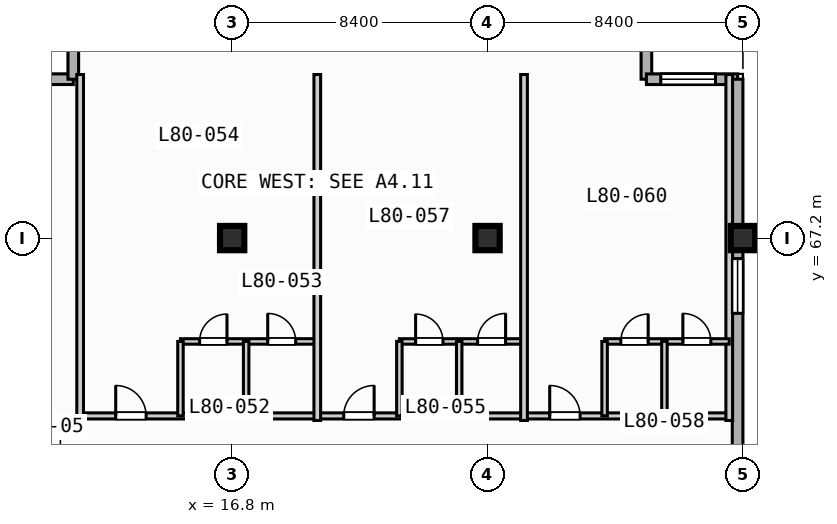
"""IFC4 building model, lengths in metres.
Left out: names, types, materials, properties, quantities, classifications, styles, units other than length and angle.
Written with IfcOpenShell. Run it as: python <this file> out.ifc"""

import sys

from ifc_helpers import new_model, si_unit, direction, frame, frame_2d, origin, origin_2d, place, context, subcontext, project, spatial, rectangle, extrude, element, fill, save


model = new_model("IFC4")
c1 = context("Model", 3, precision=1e-05, world=origin(), true_north=direction((0.0, 1.0)))
c2 = subcontext(c1, "Body", "Model", "MODEL_VIEW")
j1 = project(units=[si_unit("LENGTHUNIT", "METRE"), si_unit("PLANEANGLEUNIT", "RADIAN")], contexts=[c1])
p1 = place(None, origin())
s1 = spatial("IfcSite", under=j1, at=p1, CompositionType="ELEMENT")
p2 = place(p1, origin())
s2 = spatial("IfcBuilding", under=s1, at=p2, CompositionType="ELEMENT")
p3 = place(p2, frame((0.0, 0.0, 324.2)))
s3 = spatial("IfcBuildingStorey", under=s2, at=p3, CompositionType="ELEMENT", Elevation=324.2)
for number, where, z_axis, x_axis in (
    (1, (16.8, 67.2, 0.0), (0.0, 0.0, 1.0), (1.0, 0.0, 0.0)),
    (2, (25.2, 67.2, 0.0), (0.0, 0.0, 1.0), (1.0, 0.0, 0.0)),
    (3, (33.6, 67.2, 0.0), (0.0, 0.0, 1.0), (1.0, 0.0, 0.0)),
):
    element("IfcColumn", number, at=place(p3, frame(where, z_axis=z_axis, x_axis=x_axis)), inside=s3, PredefinedType="COLUMN", context=c2, shape_type="SweptSolid", body=[
        extrude(rectangle(XDim=0.8, YDim=0.8, at=origin_2d()), origin(), (0.0, 0.0, 1.0), 3.9),
    ])
for number, where, z_axis, x_axis in (
    (4, (8.575, 72.425, 0.0), (0.0, 0.0, 1.0), (1.0, 0.0, 0.0)),
    (5, (11.575, 72.425, 0.0), (0.0, 0.0, 1.0), (0.0, 1.0, 0.0)),
    (6, (30.425, 75.425, 0.0), (0.0, 0.0, 1.0), (0.0, -1.0, 0.0)),
):
    element("IfcWall", number, at=place(p3, frame(where, z_axis=z_axis, x_axis=x_axis)), inside=s3, PredefinedType="STANDARD", context=c2, shape_type="SweptSolid", body=[
        extrude(rectangle(XDim=3.0, YDim=0.35, at=frame_2d((1.5, 0.0))), origin(), (0.0, 0.0, 1.0), 3.67),
    ])
p4 = place(p3, frame((30.425, 72.425, 0.0), z_axis=(0.0, 0.0, 1.0), x_axis=(1.0, 0.0, 0.0)))
e7 = element("IfcWall", 7, at=p4, inside=s3, PredefinedType="STANDARD", context=c2, shape_type="SweptSolid", body=[
    extrude(rectangle(XDim=3.0, YDim=0.35, at=frame_2d((1.5, 0.0))), origin(), (0.0, 0.0, 1.0), 3.67),
])
p5 = place(p4, frame((0.472, 0.0, 0.85)))
e8 = element("IfcOpeningElement", 8, at=p5, cuts=e7, PredefinedType="OPENING", context=c2, shape_type="SweptSolid", body=[
    extrude(rectangle(XDim=1.8, YDim=1.8, at=frame_2d((0.9, 0.9))), frame((0.0, 0.185, 0.0), z_axis=(0.0, -1.0, 0.0), x_axis=(1.0, 0.0, 0.0)), (0.0, 0.0, 1.0), 0.37),
])
p6 = place(p3, frame((33.425, 72.425, 0.0), z_axis=(0.0, 0.0, 1.0), x_axis=(0.0, -1.0, 0.0)))
e9 = element("IfcWall", 9, at=p6, inside=s3, PredefinedType="STANDARD", context=c2, shape_type="SweptSolid", body=[
    extrude(rectangle(XDim=39.0, YDim=0.35, at=frame_2d((19.5, 0.0))), origin(), (0.0, 0.0, 1.0), 3.67),
])
p7 = place(p6, frame((5.9, 0.0, 0.85)))
e10 = element("IfcOpeningElement", 10, at=p7, cuts=e9, PredefinedType="OPENING", context=c2, shape_type="SweptSolid", body=[
    extrude(rectangle(XDim=1.8, YDim=1.8, at=frame_2d((0.9, 0.9))), frame((0.0, 0.185, 0.0), z_axis=(0.0, -1.0, 0.0), x_axis=(1.0, 0.0, 0.0)), (0.0, 0.0, 1.0), 0.37),
])
p8 = place(p3, frame((11.8, 61.35, 0.0), z_axis=(0.0, 0.0, 1.0), x_axis=(1.0, 0.0, 0.0)))
e11 = element("IfcWall", 11, at=p8, inside=s3, PredefinedType="PARTITIONING", context=c2, shape_type="SweptSolid", body=[
    extrude(rectangle(XDim=21.35, YDim=0.2, at=frame_2d((10.675, 0.0))), origin(), (0.0, 0.0, 1.0), 3.67),
])
p9 = place(p8, frame((1.17, 0.0, 0.0)))
e12 = element("IfcOpeningElement", 12, at=p9, cuts=e11, PredefinedType="OPENING", context=c2, shape_type="SweptSolid", body=[
    extrude(rectangle(XDim=1.0, YDim=2.15, at=frame_2d((0.5, 1.075))), frame((0.0, 0.11, 0.0), z_axis=(0.0, -1.0, 0.0), x_axis=(1.0, 0.0, 0.0)), (0.0, 0.0, 1.0), 0.22),
])
p10 = place(p8, frame((8.67, 0.0, 0.0)))
e13 = element("IfcOpeningElement", 13, at=p10, cuts=e11, PredefinedType="OPENING", context=c2, shape_type="SweptSolid", body=[
    extrude(rectangle(XDim=1.0, YDim=2.15, at=frame_2d((0.5, 1.075))), frame((0.0, 0.11, 0.0), z_axis=(0.0, -1.0, 0.0), x_axis=(1.0, 0.0, 0.0)), (0.0, 0.0, 1.0), 0.22),
])
p11 = place(p8, frame((15.445, 0.0, 0.0)))
e14 = element("IfcOpeningElement", 14, at=p11, cuts=e11, PredefinedType="OPENING", context=c2, shape_type="SweptSolid", body=[
    extrude(rectangle(XDim=1.0, YDim=2.15, at=frame_2d((0.5, 1.075))), frame((0.0, 0.11, 0.0), z_axis=(0.0, -1.0, 0.0), x_axis=(1.0, 0.0, 0.0)), (0.0, 0.0, 1.0), 0.22),
])
p12 = place(p3, frame((11.8, 61.2, 0.0), z_axis=(0.0, 0.0, 1.0), x_axis=(0.0, 1.0, 0.0)))
e15 = element("IfcWall", 15, at=p12, inside=s3, PredefinedType="PARTITIONING", context=c2, shape_type="SweptSolid", body=[
    extrude(rectangle(XDim=11.38, YDim=0.22, at=frame_2d((5.69, 0.0))), origin(), (0.0, 0.0, 1.0), 3.67),
])
p13 = place(p3, frame((15.1, 63.8, 0.0), z_axis=(0.0, 0.0, 1.0), x_axis=(1.0, 0.0, 0.0)))
e16 = element("IfcWall", 16, at=p13, inside=s3, PredefinedType="PLUMBINGWALL", context=c2, shape_type="SweptSolid", body=[
    extrude(rectangle(XDim=4.5, YDim=0.18, at=frame_2d((2.25, 0.0))), origin(), (0.0, 0.0, 1.0), 3.67),
])
p14 = place(p13, frame((0.63, 0.0, 0.0)))
e17 = element("IfcOpeningElement", 17, at=p14, cuts=e16, PredefinedType="OPENING", context=c2, shape_type="SweptSolid", body=[
    extrude(rectangle(XDim=0.9, YDim=2.1, at=frame_2d((0.45, 1.05))), frame((0.0, 0.1, 0.0), z_axis=(0.0, -1.0, 0.0), x_axis=(1.0, 0.0, 0.0)), (0.0, 0.0, 1.0), 0.2),
])
p15 = place(p13, frame((2.87, 0.0, 0.0)))
e18 = element("IfcOpeningElement", 18, at=p15, cuts=e16, PredefinedType="OPENING", context=c2, shape_type="SweptSolid", body=[
    extrude(rectangle(XDim=0.92, YDim=2.1, at=frame_2d((0.46, 1.05))), frame((0.0, 0.1, 0.0), z_axis=(0.0, -1.0, 0.0), x_axis=(1.0, 0.0, 0.0)), (0.0, 0.0, 1.0), 0.2),
])
for number, where, z_axis, x_axis in (
    (19, (15.1, 61.35, 0.0), (0.0, 0.0, 1.0), (0.0, 1.0, 0.0)),
    (20, (17.26, 61.35, 0.0), (0.0, 0.0, 1.0), (0.0, 1.0, 0.0)),
):
    element("IfcWall", number, at=place(p3, frame(where, z_axis=z_axis, x_axis=x_axis)), inside=s3, PredefinedType="PLUMBINGWALL", context=c2, shape_type="SweptSolid", body=[
        extrude(rectangle(XDim=2.45, YDim=0.18, at=frame_2d((1.225, 0.0))), origin(), (0.0, 0.0, 1.0), 3.67),
    ])
p16 = place(p3, frame((19.6, 61.2, 0.0), z_axis=(0.0, 0.0, 1.0), x_axis=(0.0, 1.0, 0.0)))
e21 = element("IfcWall", 21, at=p16, inside=s3, PredefinedType="PARTITIONING", context=c2, shape_type="SweptSolid", body=[
    extrude(rectangle(XDim=11.38, YDim=0.22, at=frame_2d((5.69, 0.0))), origin(), (0.0, 0.0, 1.0), 3.67),
])
p17 = place(p3, frame((22.3, 63.8, 0.0), z_axis=(0.0, 0.0, 1.0), x_axis=(1.0, 0.0, 0.0)))
e22 = element("IfcWall", 22, at=p17, inside=s3, PredefinedType="PLUMBINGWALL", context=c2, shape_type="SweptSolid", body=[
    extrude(rectangle(XDim=4.1, YDim=0.18, at=frame_2d((2.05, 0.0))), origin(), (0.0, 0.0, 1.0), 3.67),
])
p18 = place(p17, frame((0.534, 0.0, 0.0)))
e23 = element("IfcOpeningElement", 23, at=p18, cuts=e22, PredefinedType="OPENING", context=c2, shape_type="SweptSolid", body=[
    extrude(rectangle(XDim=0.9, YDim=2.1, at=frame_2d((0.45, 1.05))), frame((0.0, 0.1, 0.0), z_axis=(0.0, -1.0, 0.0), x_axis=(1.0, 0.0, 0.0)), (0.0, 0.0, 1.0), 0.2),
])
p19 = place(p17, frame((2.574, 0.0, 0.0)))
e24 = element("IfcOpeningElement", 24, at=p19, cuts=e22, PredefinedType="OPENING", context=c2, shape_type="SweptSolid", body=[
    extrude(rectangle(XDim=0.92, YDim=2.1, at=frame_2d((0.46, 1.05))), frame((0.0, 0.1, 0.0), z_axis=(0.0, -1.0, 0.0), x_axis=(1.0, 0.0, 0.0)), (0.0, 0.0, 1.0), 0.2),
])
for number, where, z_axis, x_axis in (
    (25, (22.3, 61.35, 0.0), (0.0, 0.0, 1.0), (0.0, 1.0, 0.0)),
    (26, (24.268, 61.35, 0.0), (0.0, 0.0, 1.0), (0.0, 1.0, 0.0)),
):
    element("IfcWall", number, at=place(p3, frame(where, z_axis=z_axis, x_axis=x_axis)), inside=s3, PredefinedType="PLUMBINGWALL", context=c2, shape_type="SweptSolid", body=[
        extrude(rectangle(XDim=2.45, YDim=0.18, at=frame_2d((1.225, 0.0))), origin(), (0.0, 0.0, 1.0), 3.67),
    ])
for number, where, z_axis, x_axis in (
    (27, (26.4, 61.2, 0.0), (0.0, 0.0, 1.0), (0.0, 1.0, 0.0)),
    (28, (33.15, 61.2, 0.0), (0.0, 0.0, 1.0), (0.0, 1.0, 0.0)),
):
    element("IfcWall", number, at=place(p3, frame(where, z_axis=z_axis, x_axis=x_axis)), inside=s3, PredefinedType="PARTITIONING", context=c2, shape_type="SweptSolid", body=[
        extrude(rectangle(XDim=11.38, YDim=0.22, at=frame_2d((5.69, 0.0))), origin(), (0.0, 0.0, 1.0), 3.67),
    ])
p20 = place(p3, frame((29.05, 63.8, 0.0), z_axis=(0.0, 0.0, 1.0), x_axis=(1.0, 0.0, 0.0)))
e29 = element("IfcWall", 29, at=p20, inside=s3, PredefinedType="PLUMBINGWALL", context=c2, shape_type="SweptSolid", body=[
    extrude(rectangle(XDim=4.1, YDim=0.18, at=frame_2d((2.05, 0.0))), origin(), (0.0, 0.0, 1.0), 3.67),
])
p21 = place(p20, frame((0.534, 0.0, 0.0)))
e30 = element("IfcOpeningElement", 30, at=p21, cuts=e29, PredefinedType="OPENING", context=c2, shape_type="SweptSolid", body=[
    extrude(rectangle(XDim=0.9, YDim=2.1, at=frame_2d((0.45, 1.05))), frame((0.0, 0.1, 0.0), z_axis=(0.0, -1.0, 0.0), x_axis=(1.0, 0.0, 0.0)), (0.0, 0.0, 1.0), 0.2),
])
p22 = place(p20, frame((2.574, 0.0, 0.0)))
e31 = element("IfcOpeningElement", 31, at=p22, cuts=e29, PredefinedType="OPENING", context=c2, shape_type="SweptSolid", body=[
    extrude(rectangle(XDim=0.92, YDim=2.1, at=frame_2d((0.46, 1.05))), frame((0.0, 0.1, 0.0), z_axis=(0.0, -1.0, 0.0), x_axis=(1.0, 0.0, 0.0)), (0.0, 0.0, 1.0), 0.2),
])
for number, where, z_axis, x_axis in (
    (32, (29.05, 61.35, 0.0), (0.0, 0.0, 1.0), (0.0, 1.0, 0.0)),
    (33, (31.018, 61.35, 0.0), (0.0, 0.0, 1.0), (0.0, 1.0, 0.0)),
):
    element("IfcWall", number, at=place(p3, frame(where, z_axis=z_axis, x_axis=x_axis)), inside=s3, PredefinedType="PLUMBINGWALL", context=c2, shape_type="SweptSolid", body=[
        extrude(rectangle(XDim=2.45, YDim=0.18, at=frame_2d((1.225, 0.0))), origin(), (0.0, 0.0, 1.0), 3.67),
    ])
p23 = place(p5, origin())
e34 = element("IfcWindow", 34, at=p23, inside=s3, PartitioningType="SINGLE_PANEL", PredefinedType="WINDOW", context=c2, shape_type="SweptSolid", body=[
    extrude(rectangle(XDim=1.8, YDim=1.8, at=frame_2d((0.9, 0.9))), frame((0.0, 0.03, 0.0), z_axis=(0.0, -1.0, 0.0), x_axis=(1.0, 0.0, 0.0)), (0.0, 0.0, 1.0), 0.06),
])
fill(e8, e34)
p24 = place(p7, origin())
e35 = element("IfcWindow", 35, at=p24, inside=s3, PartitioningType="SINGLE_PANEL", PredefinedType="WINDOW", context=c2, shape_type="SweptSolid", body=[
    extrude(rectangle(XDim=1.8, YDim=1.8, at=frame_2d((0.9, 0.9))), frame((0.0, 0.03, 0.0), z_axis=(0.0, -1.0, 0.0), x_axis=(1.0, 0.0, 0.0)), (0.0, 0.0, 1.0), 0.06),
])
fill(e10, e35)
p25 = place(p9, origin())
e36 = element("IfcDoor", 36, at=p25, inside=s3, OperationType="SINGLE_SWING_LEFT", PredefinedType="DOOR", context=c2, shape_type="SweptSolid", body=[
    extrude(rectangle(XDim=1.0, YDim=2.15, at=frame_2d((0.5, 1.075))), frame((0.0, 0.025, 0.0), z_axis=(0.0, -1.0, 0.0), x_axis=(1.0, 0.0, 0.0)), (0.0, 0.0, 1.0), 0.05),
])
fill(e12, e36)
p26 = place(p10, origin())
e37 = element("IfcDoor", 37, at=p26, inside=s3, OperationType="SINGLE_SWING_RIGHT", PredefinedType="DOOR", context=c2, shape_type="SweptSolid", body=[
    extrude(rectangle(XDim=1.0, YDim=2.15, at=frame_2d((0.5, 1.075))), frame((0.0, 0.025, 0.0), z_axis=(0.0, -1.0, 0.0), x_axis=(1.0, 0.0, 0.0)), (0.0, 0.0, 1.0), 0.05),
])
fill(e13, e37)
p27 = place(p11, origin())
e38 = element("IfcDoor", 38, at=p27, inside=s3, OperationType="SINGLE_SWING_LEFT", PredefinedType="DOOR", context=c2, shape_type="SweptSolid", body=[
    extrude(rectangle(XDim=1.0, YDim=2.15, at=frame_2d((0.5, 1.075))), frame((0.0, 0.025, 0.0), z_axis=(0.0, -1.0, 0.0), x_axis=(1.0, 0.0, 0.0)), (0.0, 0.0, 1.0), 0.05),
])
fill(e14, e38)
p28 = place(p14, origin())
e39 = element("IfcDoor", 39, at=p28, inside=s3, OperationType="SINGLE_SWING_RIGHT", PredefinedType="DOOR", context=c2, shape_type="SweptSolid", body=[
    extrude(rectangle(XDim=0.9, YDim=2.1, at=frame_2d((0.45, 1.05))), frame((0.0, 0.025, 0.0), z_axis=(0.0, -1.0, 0.0), x_axis=(1.0, 0.0, 0.0)), (0.0, 0.0, 1.0), 0.05),
])
fill(e17, e39)
p29 = place(p15, origin())
e40 = element("IfcDoor", 40, at=p29, inside=s3, OperationType="SINGLE_SWING_LEFT", PredefinedType="DOOR", context=c2, shape_type="SweptSolid", body=[
    extrude(rectangle(XDim=0.92, YDim=2.1, at=frame_2d((0.46, 1.05))), frame((0.0, 0.025, 0.0), z_axis=(0.0, -1.0, 0.0), x_axis=(1.0, 0.0, 0.0)), (0.0, 0.0, 1.0), 0.05),
])
fill(e18, e40)
p30 = place(p18, origin())
e41 = element("IfcDoor", 41, at=p30, inside=s3, OperationType="SINGLE_SWING_LEFT", PredefinedType="DOOR", context=c2, shape_type="SweptSolid", body=[
    extrude(rectangle(XDim=0.9, YDim=2.1, at=frame_2d((0.45, 1.05))), frame((0.0, 0.025, 0.0), z_axis=(0.0, -1.0, 0.0), x_axis=(1.0, 0.0, 0.0)), (0.0, 0.0, 1.0), 0.05),
])
fill(e23, e41)
p31 = place(p19, origin())
e42 = element("IfcDoor", 42, at=p31, inside=s3, OperationType="SINGLE_SWING_RIGHT", PredefinedType="DOOR", context=c2, shape_type="SweptSolid", body=[
    extrude(rectangle(XDim=0.92, YDim=2.1, at=frame_2d((0.46, 1.05))), frame((0.0, 0.025, 0.0), z_axis=(0.0, -1.0, 0.0), x_axis=(1.0, 0.0, 0.0)), (0.0, 0.0, 1.0), 0.05),
])
fill(e24, e42)
p32 = place(p21, origin())
e43 = element("IfcDoor", 43, at=p32, inside=s3, OperationType="SINGLE_SWING_RIGHT", PredefinedType="DOOR", context=c2, shape_type="SweptSolid", body=[
    extrude(rectangle(XDim=0.9, YDim=2.1, at=frame_2d((0.45, 1.05))), frame((0.0, 0.025, 0.0), z_axis=(0.0, -1.0, 0.0), x_axis=(1.0, 0.0, 0.0)), (0.0, 0.0, 1.0), 0.05),
])
fill(e30, e43)
p33 = place(p22, origin())
e44 = element("IfcDoor", 44, at=p33, inside=s3, OperationType="SINGLE_SWING_LEFT", PredefinedType="DOOR", context=c2, shape_type="SweptSolid", body=[
    extrude(rectangle(XDim=0.92, YDim=2.1, at=frame_2d((0.46, 1.05))), frame((0.0, 0.025, 0.0), z_axis=(0.0, -1.0, 0.0), x_axis=(1.0, 0.0, 0.0)), (0.0, 0.0, 1.0), 0.05),
])
fill(e31, e44)
save(model, sys.argv[1])
